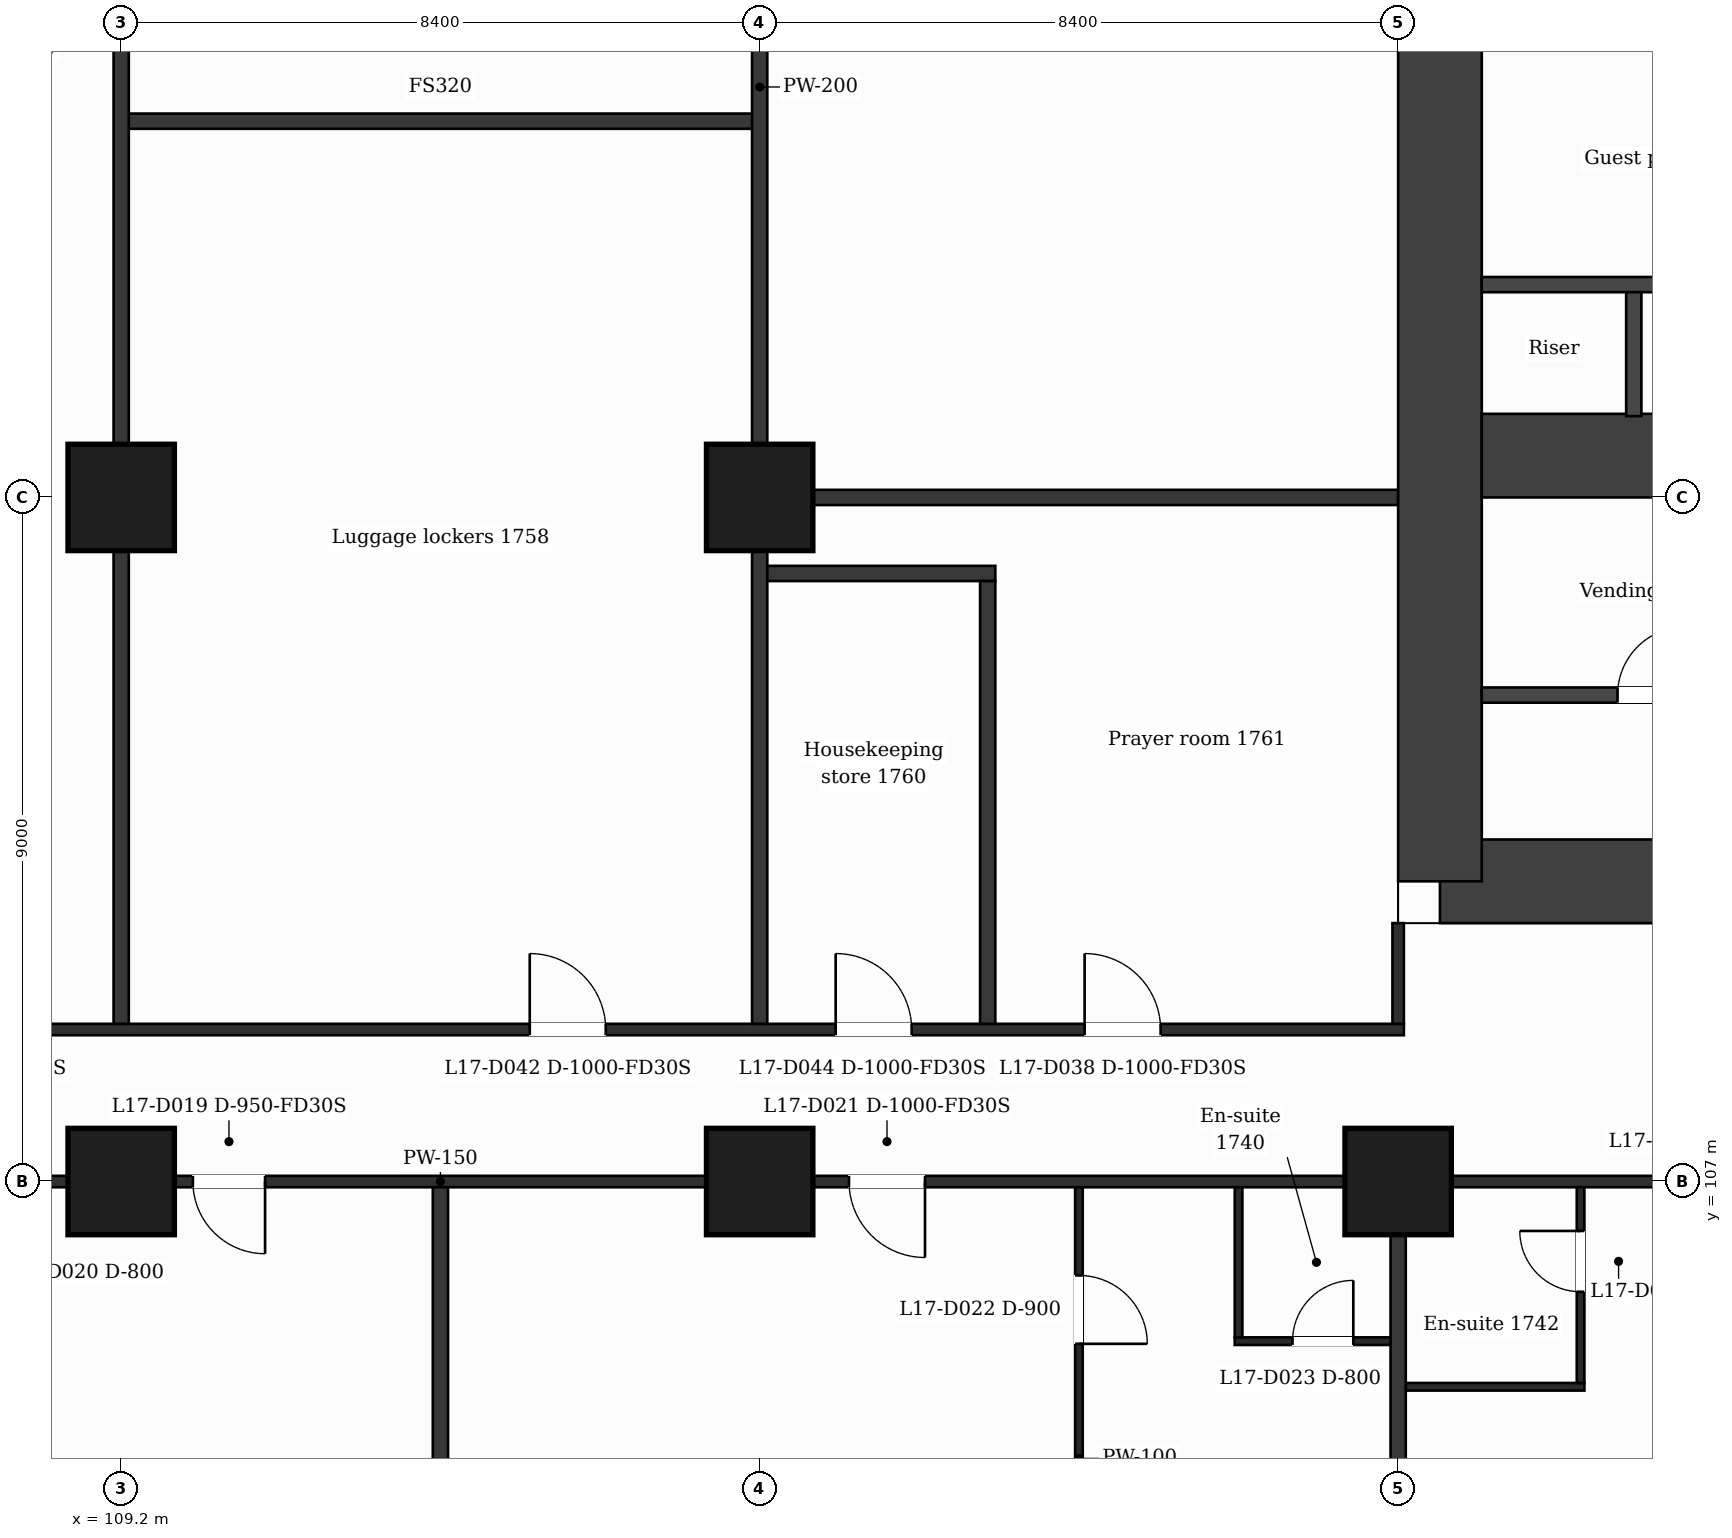
"""IFC4 building model, lengths in metres.
Left out: names, types, materials, properties, quantities, classifications, styles, units other than length and angle.
Written with IfcOpenShell. Run it as: python <this file> out.ifc"""

import sys

from ifc_helpers import new_model, si_unit, direction, frame, frame_2d, origin, origin_2d, place, context, subcontext, project, spatial, rectangle, extrude, element, fill, save


model = new_model("IFC4")
c1 = context("Model", 3, precision=1e-05, world=origin(), true_north=direction((0.0, 1.0)))
c2 = subcontext(c1, "Body", "Model", "MODEL_VIEW")
j1 = project(units=[si_unit("LENGTHUNIT", "METRE"), si_unit("PLANEANGLEUNIT", "RADIAN")], contexts=[c1])
p1 = place(None, origin())
s1 = spatial("IfcSite", under=j1, at=p1, CompositionType="ELEMENT")
p2 = place(p1, origin())
s2 = spatial("IfcBuilding", under=s1, at=p2, CompositionType="ELEMENT")
p3 = place(p2, frame((0.0, 0.0, 77.5)))
s3 = spatial("IfcBuildingStorey", under=s2, at=p3, CompositionType="ELEMENT", Elevation=77.5)
p4 = place(p3, frame((140.502, 110.95, 0.0), z_axis=(0.0, 0.0, 1.0), x_axis=(-1.0, 0.0, 0.0)))
e1 = element("IfcWall", 1, at=p4, inside=s3, PredefinedType="SHEAR", context=c2, shape_type="SweptSolid", body=[
    extrude(rectangle(XDim=13.952, YDim=1.1, at=frame_2d((6.976, 0.0))), origin(), (0.0, 0.0, 1.0), 3.5),
])
p5 = place(p4, frame((6.804, 0.0, 0.0)))
e2 = element("IfcOpeningElement", 2, at=p5, cuts=e1, PredefinedType="OPENING", context=c2, shape_type="SweptSolid", body=[
    extrude(rectangle(XDim=1.4, YDim=2.1, at=frame_2d((0.7, 1.05))), frame((0.0, 0.56, 0.0), z_axis=(0.0, -1.0, 0.0), x_axis=(1.0, 0.0, 0.0)), (0.0, 0.0, 1.0), 1.12),
])
p6 = place(p3, frame((126.55, 110.95, 0.0), z_axis=(0.0, 0.0, 1.0), x_axis=(0.0, 1.0, 0.0)))
e3 = element("IfcWall", 3, at=p6, inside=s3, PredefinedType="SHEAR", context=c2, shape_type="SweptSolid", body=[
    extrude(rectangle(XDim=20.9, YDim=1.1, at=frame_2d((10.45, 0.0))), origin(), (0.0, 0.0, 1.0), 3.5),
])
p7 = place(p3, frame((127.1, 116.55, 0.0), z_axis=(0.0, 0.0, 1.0), x_axis=(1.0, 0.0, 0.0)))
e4 = element("IfcWall", 4, at=p7, inside=s3, PredefinedType="SHEAR", context=c2, shape_type="SweptSolid", body=[
    extrude(rectangle(XDim=4.7, YDim=1.1, at=frame_2d((2.35, 0.0))), origin(), (0.0, 0.0, 1.0), 3.5),
])
for number, where, z_axis, x_axis in (
    (5, (109.2, 107.0, 0.0), (0.0, 0.0, 1.0), (1.0, 0.0, 0.0)),
    (6, (117.6, 107.0, 0.0), (0.0, 0.0, 1.0), (1.0, 0.0, 0.0)),
    (7, (126.0, 107.0, 0.0), (0.0, 0.0, 1.0), (1.0, 0.0, 0.0)),
    (8, (109.2, 116.0, 0.0), (0.0, 0.0, 1.0), (1.0, 0.0, 0.0)),
    (9, (117.6, 116.0, 0.0), (0.0, 0.0, 1.0), (1.0, 0.0, 0.0)),
):
    element("IfcColumn", number, at=place(p3, frame(where, z_axis=z_axis, x_axis=x_axis)), inside=s3, PredefinedType="COLUMN", context=c2, shape_type="SweptSolid", body=[
        extrude(rectangle(XDim=1.4, YDim=1.4, at=origin_2d()), origin(), (0.0, 0.0, 1.0), 3.5),
    ])
p8 = place(p3, frame((126.0, 104.3, 0.0), z_axis=(0.0, 0.0, 1.0), x_axis=(1.0, 0.0, 0.0)))
e10 = element("IfcWall", 10, at=p8, inside=s3, PredefinedType="PARTITIONING", context=c2, shape_type="SweptSolid", body=[
    extrude(rectangle(XDim=2.45, YDim=0.1, at=frame_2d((1.225, 0.0))), origin(), (0.0, 0.0, 1.0), 3.0),
])
p9 = place(p3, frame((123.85, 104.9, 0.0), z_axis=(0.0, 0.0, 1.0), x_axis=(1.0, 0.0, 0.0)))
e11 = element("IfcWall", 11, at=p9, inside=s3, PredefinedType="PARTITIONING", context=c2, shape_type="SweptSolid", body=[
    extrude(rectangle(XDim=2.15, YDim=0.1, at=frame_2d((1.075, 0.0))), origin(), (0.0, 0.0, 1.0), 3.0),
])
p10 = place(p9, frame((0.76, 0.0, 0.0)))
e12 = element("IfcOpeningElement", 12, at=p10, cuts=e11, PredefinedType="OPENING", context=c2, shape_type="SweptSolid", body=[
    extrude(rectangle(XDim=0.8, YDim=2.1, at=frame_2d((0.4, 1.05))), frame((0.0, 0.06, 0.0), z_axis=(0.0, -1.0, 0.0), x_axis=(1.0, 0.0, 0.0)), (0.0, 0.0, 1.0), 0.12),
])
p11 = place(p3, frame((87.018, 107.0, 0.0), z_axis=(0.0, 0.0, 1.0), x_axis=(1.0, 0.0, 0.0)))
e13 = element("IfcWall", 13, at=p11, inside=s3, PredefinedType="PARTITIONING", context=c2, shape_type="SweptSolid", body=[
    extrude(rectangle(XDim=52.765, YDim=0.15, at=frame_2d((26.382, 0.0))), origin(), (0.0, 0.0, 1.0), 3.0),
])
p12 = place(p11, frame((1.276, 0.0, 0.0)))
e14 = element("IfcOpeningElement", 14, at=p12, cuts=e13, PredefinedType="OPENING", context=c2, shape_type="SweptSolid", body=[
    extrude(rectangle(XDim=0.95, YDim=2.1, at=frame_2d((0.475, 1.05))), frame((0.0, 0.085, 0.0), z_axis=(0.0, -1.0, 0.0), x_axis=(1.0, 0.0, 0.0)), (0.0, 0.0, 1.0), 0.17),
])
p13 = place(p11, frame((10.757, 0.0, 0.0)))
e15 = element("IfcOpeningElement", 15, at=p13, cuts=e13, PredefinedType="OPENING", context=c2, shape_type="SweptSolid", body=[
    extrude(rectangle(XDim=1.0, YDim=2.1, at=frame_2d((0.5, 1.05))), frame((0.0, 0.085, 0.0), z_axis=(0.0, -1.0, 0.0), x_axis=(1.0, 0.0, 0.0)), (0.0, 0.0, 1.0), 0.17),
])
p14 = place(p11, frame((23.125, 0.0, 0.0)))
e16 = element("IfcOpeningElement", 16, at=p14, cuts=e13, PredefinedType="OPENING", context=c2, shape_type="SweptSolid", body=[
    extrude(rectangle(XDim=0.95, YDim=2.1, at=frame_2d((0.475, 1.05))), frame((0.0, 0.085, 0.0), z_axis=(0.0, -1.0, 0.0), x_axis=(1.0, 0.0, 0.0)), (0.0, 0.0, 1.0), 0.17),
])
p15 = place(p11, frame((31.757, 0.0, 0.0)))
e17 = element("IfcOpeningElement", 17, at=p15, cuts=e13, PredefinedType="OPENING", context=c2, shape_type="SweptSolid", body=[
    extrude(rectangle(XDim=1.0, YDim=2.1, at=frame_2d((0.5, 1.05))), frame((0.0, 0.085, 0.0), z_axis=(0.0, -1.0, 0.0), x_axis=(1.0, 0.0, 0.0)), (0.0, 0.0, 1.0), 0.17),
])
p16 = place(p11, frame((42.819, 0.0, 0.0)))
e18 = element("IfcOpeningElement", 18, at=p16, cuts=e13, PredefinedType="OPENING", context=c2, shape_type="SweptSolid", body=[
    extrude(rectangle(XDim=0.95, YDim=2.1, at=frame_2d((0.475, 1.05))), frame((0.0, 0.085, 0.0), z_axis=(0.0, -1.0, 0.0), x_axis=(1.0, 0.0, 0.0)), (0.0, 0.0, 1.0), 0.17),
])
p17 = place(p11, frame((48.974, 0.0, 0.0)))
e19 = element("IfcOpeningElement", 19, at=p17, cuts=e13, PredefinedType="OPENING", context=c2, shape_type="SweptSolid", body=[
    extrude(rectangle(XDim=0.95, YDim=2.1, at=frame_2d((0.475, 1.05))), frame((0.0, 0.085, 0.0), z_axis=(0.0, -1.0, 0.0), x_axis=(1.0, 0.0, 0.0)), (0.0, 0.0, 1.0), 0.17),
])
p18 = place(p3, frame((100.725, 109.0, 0.0), z_axis=(0.0, 0.0, 1.0), x_axis=(1.0, 0.0, 0.0)))
e20 = element("IfcWall", 20, at=p18, inside=s3, PredefinedType="PARTITIONING", context=c2, shape_type="SweptSolid", body=[
    extrude(rectangle(XDim=25.35, YDim=0.15, at=frame_2d((12.675, 0.0))), origin(), (0.0, 0.0, 1.0), 3.0),
])
p19 = place(p18, frame((21.15, 0.0, 0.0)))
e21 = element("IfcOpeningElement", 21, at=p19, cuts=e20, PredefinedType="OPENING", context=c2, shape_type="SweptSolid", body=[
    extrude(rectangle(XDim=1.0, YDim=2.1, at=frame_2d((0.5, 1.05))), frame((0.0, 0.085, 0.0), z_axis=(0.0, -1.0, 0.0), x_axis=(1.0, 0.0, 0.0)), (0.0, 0.0, 1.0), 0.17),
])
p20 = place(p18, frame((2.3, 0.0, 0.0)))
e22 = element("IfcOpeningElement", 22, at=p20, cuts=e20, PredefinedType="OPENING", context=c2, shape_type="SweptSolid", body=[
    extrude(rectangle(XDim=1.0, YDim=2.1, at=frame_2d((0.5, 1.05))), frame((0.0, 0.085, 0.0), z_axis=(0.0, -1.0, 0.0), x_axis=(1.0, 0.0, 0.0)), (0.0, 0.0, 1.0), 0.17),
])
p21 = place(p18, frame((5.625, 0.0, 0.0)))
e23 = element("IfcOpeningElement", 23, at=p21, cuts=e20, PredefinedType="OPENING", context=c2, shape_type="SweptSolid", body=[
    extrude(rectangle(XDim=1.0, YDim=2.1, at=frame_2d((0.5, 1.05))), frame((0.0, 0.085, 0.0), z_axis=(0.0, -1.0, 0.0), x_axis=(1.0, 0.0, 0.0)), (0.0, 0.0, 1.0), 0.17),
])
p22 = place(p18, frame((13.85, 0.0, 0.0)))
e24 = element("IfcOpeningElement", 24, at=p22, cuts=e20, PredefinedType="OPENING", context=c2, shape_type="SweptSolid", body=[
    extrude(rectangle(XDim=1.0, YDim=2.1, at=frame_2d((0.5, 1.05))), frame((0.0, 0.085, 0.0), z_axis=(0.0, -1.0, 0.0), x_axis=(1.0, 0.0, 0.0)), (0.0, 0.0, 1.0), 0.17),
])
p23 = place(p18, frame((17.875, 0.0, 0.0)))
e25 = element("IfcOpeningElement", 25, at=p23, cuts=e20, PredefinedType="OPENING", context=c2, shape_type="SweptSolid", body=[
    extrude(rectangle(XDim=1.0, YDim=2.1, at=frame_2d((0.5, 1.05))), frame((0.0, 0.085, 0.0), z_axis=(0.0, -1.0, 0.0), x_axis=(1.0, 0.0, 0.0)), (0.0, 0.0, 1.0), 0.17),
])
p24 = place(p3, frame((127.1, 113.4, 0.0), z_axis=(0.0, 0.0, 1.0), x_axis=(1.0, 0.0, 0.0)))
e26 = element("IfcWall", 26, at=p24, inside=s3, PredefinedType="PARTITIONING", context=c2, shape_type="SweptSolid", body=[
    extrude(rectangle(XDim=4.573, YDim=0.2, at=frame_2d((2.287, 0.0))), origin(), (0.0, 0.0, 1.0), 3.0),
])
p25 = place(p24, frame((1.786, 0.0, 0.0)))
e27 = element("IfcOpeningElement", 27, at=p25, cuts=e26, PredefinedType="OPENING", context=c2, shape_type="SweptSolid", body=[
    extrude(rectangle(XDim=0.9, YDim=2.1, at=frame_2d((0.45, 1.05))), frame((0.0, 0.11, 0.0), z_axis=(0.0, -1.0, 0.0), x_axis=(1.0, 0.0, 0.0)), (0.0, 0.0, 1.0), 0.22),
])
p26 = place(p3, frame((117.6, 115.0, 0.0), z_axis=(0.0, 0.0, 1.0), x_axis=(1.0, 0.0, 0.0)))
e28 = element("IfcWall", 28, at=p26, inside=s3, PredefinedType="PARTITIONING", context=c2, shape_type="SweptSolid", body=[
    extrude(rectangle(XDim=3.1, YDim=0.2, at=frame_2d((1.55, 0.0))), origin(), (0.0, 0.0, 1.0), 3.0),
])
p27 = place(p3, frame((117.6, 116.0, 0.0), z_axis=(0.0, 0.0, 1.0), x_axis=(1.0, 0.0, 0.0)))
e29 = element("IfcWall", 29, at=p27, inside=s3, PredefinedType="PARTITIONING", context=c2, shape_type="SweptSolid", body=[
    extrude(rectangle(XDim=8.4, YDim=0.2, at=frame_2d((4.2, 0.0))), origin(), (0.0, 0.0, 1.0), 3.0),
])
p28 = place(p3, frame((127.1, 118.8, 0.0), z_axis=(0.0, 0.0, 1.0), x_axis=(1.0, 0.0, 0.0)))
e30 = element("IfcWall", 30, at=p28, inside=s3, PredefinedType="PARTITIONING", context=c2, shape_type="SweptSolid", body=[
    extrude(rectangle(XDim=4.473, YDim=0.2, at=frame_2d((2.236, 0.0))), origin(), (0.0, 0.0, 1.0), 3.0),
])
p29 = place(p3, frame((109.2, 120.95, 0.0), z_axis=(0.0, 0.0, 1.0), x_axis=(1.0, 0.0, 0.0)))
e31 = element("IfcWall", 31, at=p29, inside=s3, PredefinedType="PARTITIONING", context=c2, shape_type="SweptSolid", body=[
    extrude(rectangle(XDim=8.4, YDim=0.2, at=frame_2d((4.2, 0.0))), origin(), (0.0, 0.0, 1.0), 3.0),
])
p30 = place(p3, frame((109.2, 109.075, 0.0), z_axis=(0.0, 0.0, 1.0), x_axis=(0.0, 1.0, 0.0)))
e32 = element("IfcWall", 32, at=p30, inside=s3, PredefinedType="PARTITIONING", context=c2, shape_type="SweptSolid", body=[
    extrude(rectangle(XDim=24.65, YDim=0.2, at=frame_2d((12.325, 0.0))), origin(), (0.0, 0.0, 1.0), 3.0),
])
p31 = place(p3, frame((113.4, 99.79, 0.0), z_axis=(0.0, 0.0, 1.0), x_axis=(0.0, 1.0, 0.0)))
e33 = element("IfcWall", 33, at=p31, inside=s3, PredefinedType="PARTITIONING", context=c2, shape_type="SweptSolid", body=[
    extrude(rectangle(XDim=7.135, YDim=0.2, at=frame_2d((3.567, 0.0))), origin(), (0.0, 0.0, 1.0), 3.0),
])
p32 = place(p3, frame((117.6, 109.075, 0.0), z_axis=(0.0, 0.0, 1.0), x_axis=(0.0, 1.0, 0.0)))
e34 = element("IfcWall", 34, at=p32, inside=s3, PredefinedType="PARTITIONING", context=c2, shape_type="SweptSolid", body=[
    extrude(rectangle(XDim=24.65, YDim=0.2, at=frame_2d((12.325, 0.0))), origin(), (0.0, 0.0, 1.0), 3.0),
])
p33 = place(p3, frame((120.6, 109.075, 0.0), z_axis=(0.0, 0.0, 1.0), x_axis=(0.0, 1.0, 0.0)))
e35 = element("IfcWall", 35, at=p33, inside=s3, PredefinedType="PARTITIONING", context=c2, shape_type="SweptSolid", body=[
    extrude(rectangle(XDim=5.825, YDim=0.2, at=frame_2d((2.913, 0.0))), origin(), (0.0, 0.0, 1.0), 3.0),
])
p34 = place(p3, frame((121.8, 99.79, 0.0), z_axis=(0.0, 0.0, 1.0), x_axis=(0.0, 1.0, 0.0)))
e36 = element("IfcWall", 36, at=p34, inside=s3, PredefinedType="PARTITIONING", context=c2, shape_type="SweptSolid", body=[
    extrude(rectangle(XDim=7.135, YDim=0.1, at=frame_2d((3.567, 0.0))), origin(), (0.0, 0.0, 1.0), 3.0),
])
p35 = place(p34, frame((5.075, 0.0, 0.0)))
e37 = element("IfcOpeningElement", 37, at=p35, cuts=e36, PredefinedType="OPENING", context=c2, shape_type="SweptSolid", body=[
    extrude(rectangle(XDim=0.9, YDim=2.1, at=frame_2d((0.45, 1.05))), frame((0.0, 0.06, 0.0), z_axis=(0.0, -1.0, 0.0), x_axis=(1.0, 0.0, 0.0)), (0.0, 0.0, 1.0), 0.12),
])
p36 = place(p3, frame((123.9, 104.95, 0.0), z_axis=(0.0, 0.0, 1.0), x_axis=(0.0, 1.0, 0.0)))
e38 = element("IfcWall", 38, at=p36, inside=s3, PredefinedType="PARTITIONING", context=c2, shape_type="SweptSolid", body=[
    extrude(rectangle(XDim=1.975, YDim=0.1, at=frame_2d((0.988, 0.0))), origin(), (0.0, 0.0, 1.0), 3.0),
])
p37 = place(p3, frame((126.0, 99.79, 0.0), z_axis=(0.0, 0.0, 1.0), x_axis=(0.0, 1.0, 0.0)))
e39 = element("IfcWall", 39, at=p37, inside=s3, PredefinedType="PARTITIONING", context=c2, shape_type="SweptSolid", body=[
    extrude(rectangle(XDim=7.135, YDim=0.2, at=frame_2d((3.567, 0.0))), origin(), (0.0, 0.0, 1.0), 3.0),
])
p38 = place(p3, frame((126.0, 109.075, 0.0), z_axis=(0.0, 0.0, 1.0), x_axis=(0.0, 1.0, 0.0)))
e40 = element("IfcWall", 40, at=p38, inside=s3, PredefinedType="PARTITIONING", context=c2, shape_type="SweptSolid", body=[
    extrude(rectangle(XDim=1.325, YDim=0.15, at=frame_2d((0.663, 0.0))), origin(), (0.0, 0.0, 1.0), 3.0),
])
p39 = place(p3, frame((128.4, 104.35, 0.0), z_axis=(0.0, 0.0, 1.0), x_axis=(0.0, 1.0, 0.0)))
e41 = element("IfcWall", 41, at=p39, inside=s3, PredefinedType="PARTITIONING", context=c2, shape_type="SweptSolid", body=[
    extrude(rectangle(XDim=2.575, YDim=0.1, at=frame_2d((1.288, 0.0))), origin(), (0.0, 0.0, 1.0), 3.0),
])
p40 = place(p39, frame((1.2, 0.0, 0.0)))
e42 = element("IfcOpeningElement", 42, at=p40, cuts=e41, PredefinedType="OPENING", context=c2, shape_type="SweptSolid", body=[
    extrude(rectangle(XDim=0.8, YDim=2.1, at=frame_2d((0.4, 1.05))), frame((0.0, 0.06, 0.0), z_axis=(0.0, -1.0, 0.0), x_axis=(1.0, 0.0, 0.0)), (0.0, 0.0, 1.0), 0.12),
])
p41 = place(p3, frame((129.1, 117.07, 0.0), z_axis=(0.0, 0.0, 1.0), x_axis=(0.0, 1.0, 0.0)))
e43 = element("IfcWall", 43, at=p41, inside=s3, PredefinedType="PARTITIONING", context=c2, shape_type="SweptSolid", body=[
    extrude(rectangle(XDim=1.63, YDim=0.2, at=frame_2d((0.815, 0.0))), origin(), (0.0, 0.0, 1.0), 3.0),
])
p42 = place(p25, origin())
e44 = element("IfcDoor", 44, at=p42, inside=s3, OperationType="SINGLE_SWING_RIGHT", PredefinedType="DOOR", context=c2, shape_type="SweptSolid", body=[
    extrude(rectangle(XDim=0.9, YDim=2.1, at=frame_2d((0.45, 1.05))), frame((0.0, 0.025, 0.0), z_axis=(0.0, -1.0, 0.0), x_axis=(1.0, 0.0, 0.0)), (0.0, 0.0, 1.0), 0.05),
])
fill(e27, e44)
p43 = place(p14, origin())
e45 = element("IfcDoor", 45, at=p43, inside=s3, OperationType="SINGLE_SWING_RIGHT", PredefinedType="DOOR", context=c2, shape_type="SweptSolid", body=[
    extrude(rectangle(XDim=0.95, YDim=2.1, at=frame_2d((0.475, 1.05))), frame((0.0, 0.025, 0.0), z_axis=(0.0, -1.0, 0.0), x_axis=(1.0, 0.0, 0.0)), (0.0, 0.0, 1.0), 0.05),
])
fill(e16, e45)
p44 = place(p15, origin())
e46 = element("IfcDoor", 46, at=p44, inside=s3, OperationType="SINGLE_SWING_RIGHT", PredefinedType="DOOR", context=c2, shape_type="SweptSolid", body=[
    extrude(rectangle(XDim=1.0, YDim=2.1, at=frame_2d((0.5, 1.05))), frame((0.0, 0.025, 0.0), z_axis=(0.0, -1.0, 0.0), x_axis=(1.0, 0.0, 0.0)), (0.0, 0.0, 1.0), 0.05),
])
fill(e17, e46)
p45 = place(p35, origin())
e47 = element("IfcDoor", 47, at=p45, inside=s3, OperationType="SINGLE_SWING_LEFT", PredefinedType="DOOR", context=c2, shape_type="SweptSolid", body=[
    extrude(rectangle(XDim=0.9, YDim=2.1, at=frame_2d((0.45, 1.05))), frame((0.0, 0.025, 0.0), z_axis=(0.0, -1.0, 0.0), x_axis=(1.0, 0.0, 0.0)), (0.0, 0.0, 1.0), 0.05),
])
fill(e37, e47)
p46 = place(p10, origin())
e48 = element("IfcDoor", 48, at=p46, inside=s3, OperationType="SINGLE_SWING_RIGHT", PredefinedType="DOOR", context=c2, shape_type="SweptSolid", body=[
    extrude(rectangle(XDim=0.8, YDim=2.1, at=frame_2d((0.4, 1.05))), frame((0.0, 0.025, 0.0), z_axis=(0.0, -1.0, 0.0), x_axis=(1.0, 0.0, 0.0)), (0.0, 0.0, 1.0), 0.05),
])
fill(e12, e48)
p47 = place(p40, origin())
e49 = element("IfcDoor", 49, at=p47, inside=s3, OperationType="SINGLE_SWING_RIGHT", PredefinedType="DOOR", context=c2, shape_type="SweptSolid", body=[
    extrude(rectangle(XDim=0.8, YDim=2.1, at=frame_2d((0.4, 1.05))), frame((0.0, 0.025, 0.0), z_axis=(0.0, -1.0, 0.0), x_axis=(1.0, 0.0, 0.0)), (0.0, 0.0, 1.0), 0.05),
])
fill(e42, e49)
p48 = place(p19, origin())
e50 = element("IfcDoor", 50, at=p48, inside=s3, OperationType="SINGLE_SWING_LEFT", PredefinedType="DOOR", context=c2, shape_type="SweptSolid", body=[
    extrude(rectangle(XDim=1.0, YDim=2.1, at=frame_2d((0.5, 1.05))), frame((0.0, 0.025, 0.0), z_axis=(0.0, -1.0, 0.0), x_axis=(1.0, 0.0, 0.0)), (0.0, 0.0, 1.0), 0.05),
])
fill(e21, e50)
p49 = place(p22, origin())
e51 = element("IfcDoor", 51, at=p49, inside=s3, OperationType="SINGLE_SWING_LEFT", PredefinedType="DOOR", context=c2, shape_type="SweptSolid", body=[
    extrude(rectangle(XDim=1.0, YDim=2.1, at=frame_2d((0.5, 1.05))), frame((0.0, 0.025, 0.0), z_axis=(0.0, -1.0, 0.0), x_axis=(1.0, 0.0, 0.0)), (0.0, 0.0, 1.0), 0.05),
])
fill(e24, e51)
p50 = place(p23, origin())
e52 = element("IfcDoor", 52, at=p50, inside=s3, OperationType="SINGLE_SWING_LEFT", PredefinedType="DOOR", context=c2, shape_type="SweptSolid", body=[
    extrude(rectangle(XDim=1.0, YDim=2.1, at=frame_2d((0.5, 1.05))), frame((0.0, 0.025, 0.0), z_axis=(0.0, -1.0, 0.0), x_axis=(1.0, 0.0, 0.0)), (0.0, 0.0, 1.0), 0.05),
])
fill(e25, e52)
save(model, sys.argv[1])
